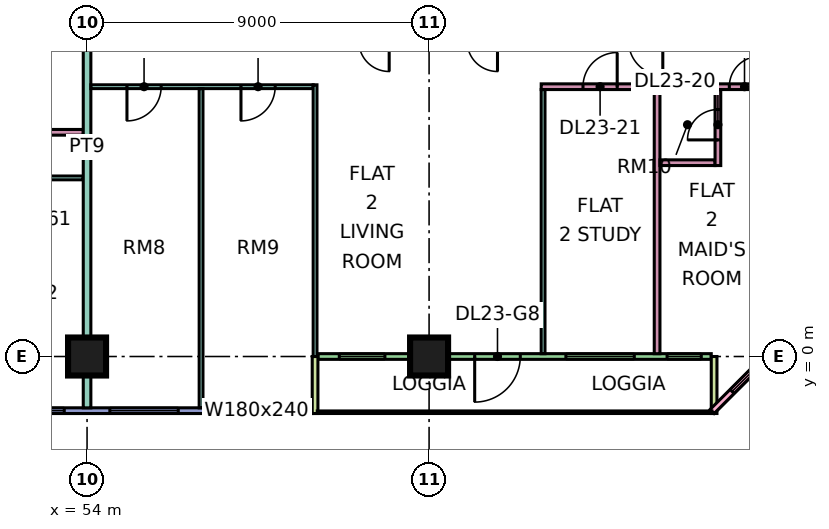
"""IFC4 building model, lengths in metres.
Left out: names, types, materials, properties, quantities, classifications, styles, units other than length and angle.
Written with IfcOpenShell. Run it as: python <this file> out.ifc"""

import sys

from ifc_helpers import new_model, si_unit, direction, frame, frame_2d, origin, origin_2d, place, context, subcontext, project, spatial, rectangle, extrude, element, fill, save


model = new_model("IFC4")
c1 = context("Model", 3, precision=1e-05, world=origin(), true_north=direction((0.0, 1.0)))
c2 = subcontext(c1, "Body", "Model", "MODEL_VIEW")
j1 = project(units=[si_unit("LENGTHUNIT", "METRE"), si_unit("PLANEANGLEUNIT", "RADIAN")], contexts=[c1])
p1 = place(None, origin())
s1 = spatial("IfcSite", under=j1, at=p1, CompositionType="ELEMENT")
p2 = place(p1, origin())
s2 = spatial("IfcBuilding", under=s1, at=p2, CompositionType="ELEMENT")
p3 = place(p2, frame((0.0, 0.0, 103.15)))
s3 = spatial("IfcBuildingStorey", under=s2, at=p3, CompositionType="ELEMENT", Elevation=103.15)
for number, where, z_axis, x_axis in (
    (1, (54.0, 0.0, 0.0), (0.0, 0.0, 1.0), (1.0, 0.0, 0.0)),
    (2, (63.0, 0.0, 0.0), (0.0, 0.0, 1.0), (1.0, 0.0, 0.0)),
):
    element("IfcColumn", number, at=place(p3, frame(where, z_axis=z_axis, x_axis=x_axis)), inside=s3, PredefinedType="COLUMN", context=c2, shape_type="SweptSolid", body=[
        extrude(rectangle(XDim=1.0, YDim=1.0, at=origin_2d()), origin(), (0.0, 0.0, 1.0), 3.75),
    ])
p4 = place(p3, frame((48.075, -1.425, 0.0), z_axis=(0.0, 0.0, 1.0), x_axis=(1.0, 0.0, 0.0)))
e3 = element("IfcWall", 3, at=p4, inside=s3, PredefinedType="SOLIDWALL", context=c2, shape_type="SweptSolid", body=[
    extrude(rectangle(XDim=11.85, YDim=0.15, at=frame_2d((5.925, 0.0))), origin(), (0.0, 0.0, 1.0), 3.35),
])
p5 = place(p4, frame((0.562, 0.0, 0.45)))
e4 = element("IfcOpeningElement", 4, at=p5, cuts=e3, PredefinedType="OPENING", context=c2, shape_type="SweptSolid", body=[
    extrude(rectangle(XDim=1.8, YDim=2.4, at=frame_2d((0.9, 1.2))), frame((0.0, 0.085, 0.0), z_axis=(0.0, -1.0, 0.0), x_axis=(1.0, 0.0, 0.0)), (0.0, 0.0, 1.0), 0.17),
])
p6 = place(p4, frame((3.525, 0.0, 0.45)))
e5 = element("IfcOpeningElement", 5, at=p6, cuts=e3, PredefinedType="OPENING", context=c2, shape_type="SweptSolid", body=[
    extrude(rectangle(XDim=1.8, YDim=2.4, at=frame_2d((0.9, 1.2))), frame((0.0, 0.085, 0.0), z_axis=(0.0, -1.0, 0.0), x_axis=(1.0, 0.0, 0.0)), (0.0, 0.0, 1.0), 0.17),
])
p7 = place(p4, frame((6.525, 0.0, 0.45)))
e6 = element("IfcOpeningElement", 6, at=p7, cuts=e3, PredefinedType="OPENING", context=c2, shape_type="SweptSolid", body=[
    extrude(rectangle(XDim=1.8, YDim=2.4, at=frame_2d((0.9, 1.2))), frame((0.0, 0.085, 0.0), z_axis=(0.0, -1.0, 0.0), x_axis=(1.0, 0.0, 0.0)), (0.0, 0.0, 1.0), 0.17),
])
p8 = place(p4, frame((9.488, 0.0, 0.45)))
e7 = element("IfcOpeningElement", 7, at=p8, cuts=e3, PredefinedType="OPENING", context=c2, shape_type="SweptSolid", body=[
    extrude(rectangle(XDim=1.8, YDim=2.4, at=frame_2d((0.9, 1.2))), frame((0.0, 0.085, 0.0), z_axis=(0.0, -1.0, 0.0), x_axis=(1.0, 0.0, 0.0)), (0.0, 0.0, 1.0), 0.17),
])
p9 = place(p3, frame((60.075, 0.0, 0.0), z_axis=(0.0, 0.0, 1.0), x_axis=(1.0, 0.0, 0.0)))
e8 = element("IfcWall", 8, at=p9, inside=s3, PredefinedType="SOLIDWALL", context=c2, shape_type="SweptSolid", body=[
    extrude(rectangle(XDim=10.35, YDim=0.15, at=frame_2d((5.175, 0.0))), origin(), (0.0, 0.0, 1.0), 3.35),
])
p10 = place(p9, frame((0.562, 0.0, 0.45)))
e9 = element("IfcOpeningElement", 9, at=p10, cuts=e8, PredefinedType="OPENING", context=c2, shape_type="SweptSolid", body=[
    extrude(rectangle(XDim=1.2, YDim=2.4, at=frame_2d((0.6, 1.2))), frame((0.0, 0.085, 0.0), z_axis=(0.0, -1.0, 0.0), x_axis=(1.0, 0.0, 0.0)), (0.0, 0.0, 1.0), 0.17),
])
p11 = place(p9, frame((4.125, 0.0, 0.0)))
e10 = element("IfcOpeningElement", 10, at=p11, cuts=e8, PredefinedType="OPENING", context=c2, shape_type="SweptSolid", body=[
    extrude(rectangle(XDim=1.2, YDim=2.4, at=frame_2d((0.6, 1.2))), frame((0.0, 0.085, 0.0), z_axis=(0.0, -1.0, 0.0), x_axis=(1.0, 0.0, 0.0)), (0.0, 0.0, 1.0), 0.17),
])
p12 = place(p9, frame((6.525, 0.0, 0.45)))
e11 = element("IfcOpeningElement", 11, at=p12, cuts=e8, PredefinedType="OPENING", context=c2, shape_type="SweptSolid", body=[
    extrude(rectangle(XDim=1.8, YDim=2.4, at=frame_2d((0.9, 1.2))), frame((0.0, 0.085, 0.0), z_axis=(0.0, -1.0, 0.0), x_axis=(1.0, 0.0, 0.0)), (0.0, 0.0, 1.0), 0.17),
])
p13 = place(p9, frame((9.188, 0.0, 0.45)))
e12 = element("IfcOpeningElement", 12, at=p13, cuts=e8, PredefinedType="OPENING", context=c2, shape_type="SweptSolid", body=[
    extrude(rectangle(XDim=0.9, YDim=2.4, at=frame_2d((0.45, 1.2))), frame((0.0, 0.085, 0.0), z_axis=(0.0, -1.0, 0.0), x_axis=(1.0, 0.0, 0.0)), (0.0, 0.0, 1.0), 0.17),
])
for number, where, z_axis, x_axis in (
    (13, (60.0, -1.5, 0.0), (0.0, 0.0, 1.0), (0.0, 1.0, 0.0)),
    (14, (70.5, -1.5, 0.0), (0.0, 0.0, 1.0), (0.0, 1.0, 0.0)),
):
    element("IfcWall", number, at=place(p3, frame(where, z_axis=z_axis, x_axis=x_axis)), inside=s3, PredefinedType="SOLIDWALL", context=c2, shape_type="SweptSolid", body=[
        extrude(rectangle(XDim=1.5, YDim=0.15, at=frame_2d((0.75, 0.0))), origin(), (0.0, 0.0, 1.0), 3.35),
    ])
p14 = place(p3, frame((70.447, -1.447, 0.0), z_axis=(0.0, 0.0, 1.0), x_axis=(0.707106781187, 0.707106781187, 0.0)))
e15 = element("IfcWall", 15, at=p14, inside=s3, PredefinedType="SOLIDWALL", context=c2, shape_type="SweptSolid", body=[
    extrude(rectangle(XDim=4.243, YDim=0.15, at=frame_2d((2.121, 0.0))), origin(), (0.0, 0.0, 1.0), 3.35),
])
p15 = place(p14, frame((0.744, 0.0, 0.45)))
e16 = element("IfcOpeningElement", 16, at=p15, cuts=e15, PredefinedType="OPENING", context=c2, shape_type="SweptSolid", body=[
    extrude(rectangle(XDim=3.0, YDim=2.4, at=frame_2d((1.5, 1.2))), frame((0.0, 0.085, 0.0), z_axis=(0.0, -1.0, 0.0), x_axis=(1.0, 0.0, 0.0)), (0.0, 0.0, 1.0), 0.17),
])
p16 = place(p3, frame((33.05, 4.7, 0.0), z_axis=(0.0, 0.0, 1.0), x_axis=(1.0, 0.0, 0.0)))
e17 = element("IfcWall", 17, at=p16, inside=s3, PredefinedType="PARTITIONING", context=c2, shape_type="SweptSolid", body=[
    extrude(rectangle(XDim=20.85, YDim=0.1, at=frame_2d((10.425, 0.0))), origin(), (0.0, 0.0, 1.0), 3.35),
])
p17 = place(p16, frame((1.0, 0.0, 0.0)))
e18 = element("IfcOpeningElement", 18, at=p17, cuts=e17, PredefinedType="OPENING", context=c2, shape_type="SweptSolid", body=[
    extrude(rectangle(XDim=0.9, YDim=2.1, at=frame_2d((0.45, 1.05))), frame((0.0, 0.06, 0.0), z_axis=(0.0, -1.0, 0.0), x_axis=(1.0, 0.0, 0.0)), (0.0, 0.0, 1.0), 0.12),
])
p18 = place(p16, frame((4.0, 0.0, 0.0)))
e19 = element("IfcOpeningElement", 19, at=p18, cuts=e17, PredefinedType="OPENING", context=c2, shape_type="SweptSolid", body=[
    extrude(rectangle(XDim=0.9, YDim=2.1, at=frame_2d((0.45, 1.05))), frame((0.0, 0.06, 0.0), z_axis=(0.0, -1.0, 0.0), x_axis=(1.0, 0.0, 0.0)), (0.0, 0.0, 1.0), 0.12),
])
p19 = place(p16, frame((7.0, 0.0, 0.0)))
e20 = element("IfcOpeningElement", 20, at=p19, cuts=e17, PredefinedType="OPENING", context=c2, shape_type="SweptSolid", body=[
    extrude(rectangle(XDim=0.9, YDim=2.1, at=frame_2d((0.45, 1.05))), frame((0.0, 0.06, 0.0), z_axis=(0.0, -1.0, 0.0), x_axis=(1.0, 0.0, 0.0)), (0.0, 0.0, 1.0), 0.12),
])
p20 = place(p16, frame((19.0, 0.0, 0.0)))
e21 = element("IfcOpeningElement", 21, at=p20, cuts=e17, PredefinedType="OPENING", context=c2, shape_type="SweptSolid", body=[
    extrude(rectangle(XDim=0.9, YDim=2.1, at=frame_2d((0.45, 1.05))), frame((0.0, 0.06, 0.0), z_axis=(0.0, -1.0, 0.0), x_axis=(1.0, 0.0, 0.0)), (0.0, 0.0, 1.0), 0.12),
])
p21 = place(p16, frame((13.0, 0.0, 0.0)))
e22 = element("IfcOpeningElement", 22, at=p21, cuts=e17, PredefinedType="OPENING", context=c2, shape_type="SweptSolid", body=[
    extrude(rectangle(XDim=0.9, YDim=2.1, at=frame_2d((0.45, 1.05))), frame((0.0, 0.06, 0.0), z_axis=(0.0, -1.0, 0.0), x_axis=(1.0, 0.0, 0.0)), (0.0, 0.0, 1.0), 0.12),
])
p22 = place(p3, frame((43.575, 5.9, 0.0), z_axis=(0.0, 0.0, 1.0), x_axis=(1.0, 0.0, 0.0)))
e23 = element("IfcWall", 23, at=p22, inside=s3, PredefinedType="PARTITIONING", context=c2, shape_type="SweptSolid", body=[
    extrude(rectangle(XDim=10.325, YDim=0.15, at=frame_2d((5.163, 0.0))), origin(), (0.0, 0.0, 1.0), 3.35),
])
p23 = place(p22, frame((1.825, 0.0, 0.0)))
e24 = element("IfcOpeningElement", 24, at=p23, cuts=e23, PredefinedType="OPENING", context=c2, shape_type="SweptSolid", body=[
    extrude(rectangle(XDim=0.8, YDim=2.1, at=frame_2d((0.4, 1.05))), frame((0.0, 0.085, 0.0), z_axis=(0.0, -1.0, 0.0), x_axis=(1.0, 0.0, 0.0)), (0.0, 0.0, 1.0), 0.17),
])
p24 = place(p22, frame((6.975, 0.0, 0.0)))
e25 = element("IfcOpeningElement", 25, at=p24, cuts=e23, PredefinedType="OPENING", context=c2, shape_type="SweptSolid", body=[
    extrude(rectangle(XDim=0.9, YDim=2.1, at=frame_2d((0.45, 1.05))), frame((0.0, 0.085, 0.0), z_axis=(0.0, -1.0, 0.0), x_axis=(1.0, 0.0, 0.0)), (0.0, 0.0, 1.0), 0.17),
])
p25 = place(p3, frame((54.0, -1.351, 0.0), z_axis=(0.0, 0.0, 1.0), x_axis=(0.0, 1.0, 0.0)))
e26 = element("IfcWall", 26, at=p25, inside=s3, PredefinedType="PARTITIONING", context=c2, shape_type="SweptSolid", body=[
    extrude(rectangle(XDim=13.751, YDim=0.2, at=frame_2d((6.875, 0.0))), origin(), (0.0, 0.0, 1.0), 3.35),
])
p26 = place(p3, frame((54.1, 7.1, 0.0), z_axis=(0.0, 0.0, 1.0), x_axis=(1.0, 0.0, 0.0)))
e27 = element("IfcWall", 27, at=p26, inside=s3, PredefinedType="PARTITIONING", context=c2, shape_type="SweptSolid", body=[
    extrude(rectangle(XDim=5.85, YDim=0.1, at=frame_2d((2.925, 0.0))), origin(), (0.0, 0.0, 1.0), 3.35),
])
p27 = place(p26, frame((0.95, 0.0, 0.0)))
e28 = element("IfcOpeningElement", 28, at=p27, cuts=e27, PredefinedType="OPENING", context=c2, shape_type="SweptSolid", body=[
    extrude(rectangle(XDim=0.9, YDim=2.1, at=frame_2d((0.45, 1.05))), frame((0.0, 0.06, 0.0), z_axis=(0.0, -1.0, 0.0), x_axis=(1.0, 0.0, 0.0)), (0.0, 0.0, 1.0), 0.12),
])
p28 = place(p26, frame((3.95, 0.0, 0.0)))
e29 = element("IfcOpeningElement", 29, at=p28, cuts=e27, PredefinedType="OPENING", context=c2, shape_type="SweptSolid", body=[
    extrude(rectangle(XDim=0.9, YDim=2.1, at=frame_2d((0.45, 1.05))), frame((0.0, 0.06, 0.0), z_axis=(0.0, -1.0, 0.0), x_axis=(1.0, 0.0, 0.0)), (0.0, 0.0, 1.0), 0.12),
])
p29 = place(p3, frame((57.0, -1.351, 0.0), z_axis=(0.0, 0.0, 1.0), x_axis=(0.0, 1.0, 0.0)))
e30 = element("IfcWall", 30, at=p29, inside=s3, PredefinedType="PARTITIONING", context=c2, shape_type="SweptSolid", body=[
    extrude(rectangle(XDim=8.401, YDim=0.1, at=frame_2d((4.201, 0.0))), origin(), (0.0, 0.0, 1.0), 3.35),
])
p30 = place(p3, frame((60.0, 0.0, 0.0), z_axis=(0.0, 0.0, 1.0), x_axis=(0.0, 1.0, 0.0)))
e31 = element("IfcWall", 31, at=p30, inside=s3, PredefinedType="PARTITIONING", context=c2, shape_type="SweptSolid", body=[
    extrude(rectangle(XDim=7.15, YDim=0.1, at=frame_2d((3.575, 0.0))), origin(), (0.0, 0.0, 1.0), 3.35),
])
p31 = place(p3, frame((65.95, 7.1, 0.0), z_axis=(0.0, 0.0, 1.0), x_axis=(1.0, 0.0, 0.0)))
e32 = element("IfcWall", 32, at=p31, inside=s3, PredefinedType="PARTITIONING", context=c2, shape_type="SweptSolid", body=[
    extrude(rectangle(XDim=7.4, YDim=0.15, at=frame_2d((3.7, 0.0))), origin(), (0.0, 0.0, 1.0), 3.35),
])
p32 = place(p31, frame((4.95, 0.0, 0.0)))
e33 = element("IfcOpeningElement", 33, at=p32, cuts=e32, PredefinedType="OPENING", context=c2, shape_type="SweptSolid", body=[
    extrude(rectangle(XDim=0.8, YDim=2.1, at=frame_2d((0.4, 1.05))), frame((0.0, 0.085, 0.0), z_axis=(0.0, -1.0, 0.0), x_axis=(1.0, 0.0, 0.0)), (0.0, 0.0, 1.0), 0.17),
])
p33 = place(p31, frame((1.1, 0.0, 0.0)))
e34 = element("IfcOpeningElement", 34, at=p33, cuts=e32, PredefinedType="OPENING", context=c2, shape_type="SweptSolid", body=[
    extrude(rectangle(XDim=0.9, YDim=2.1, at=frame_2d((0.45, 1.05))), frame((0.0, 0.085, 0.0), z_axis=(0.0, -1.0, 0.0), x_axis=(1.0, 0.0, 0.0)), (0.0, 0.0, 1.0), 0.17),
])
p34 = place(p3, frame((66.0, 0.074, 0.0), z_axis=(0.0, 0.0, 1.0), x_axis=(0.0, 1.0, 0.0)))
e35 = element("IfcWall", 35, at=p34, inside=s3, PredefinedType="PARTITIONING", context=c2, shape_type="SweptSolid", body=[
    extrude(rectangle(XDim=6.951, YDim=0.1, at=frame_2d((3.476, 0.0))), origin(), (0.0, 0.0, 1.0), 3.35),
])
p35 = place(p3, frame((69.0, 0.074, 0.0), z_axis=(0.0, 0.0, 1.0), x_axis=(0.0, 1.0, 0.0)))
e36 = element("IfcWall", 36, at=p35, inside=s3, PredefinedType="PARTITIONING", context=c2, shape_type="SweptSolid", body=[
    extrude(rectangle(XDim=6.951, YDim=0.15, at=frame_2d((3.476, 0.0))), origin(), (0.0, 0.0, 1.0), 3.35),
])
p36 = place(p3, frame((69.075, 5.1, 0.0), z_axis=(0.0, 0.0, 1.0), x_axis=(1.0, 0.0, 0.0)))
e37 = element("IfcWall", 37, at=p36, inside=s3, PredefinedType="PARTITIONING", context=c2, shape_type="SweptSolid", body=[
    extrude(rectangle(XDim=1.45, YDim=0.15, at=frame_2d((0.725, 0.0))), origin(), (0.0, 0.0, 1.0), 3.35),
])
p37 = place(p3, frame((70.6, 5.025, 0.0), z_axis=(0.0, 0.0, 1.0), x_axis=(0.0, 1.0, 0.0)))
e38 = element("IfcWall", 38, at=p37, inside=s3, PredefinedType="PARTITIONING", context=c2, shape_type="SweptSolid", body=[
    extrude(rectangle(XDim=2.0, YDim=0.15, at=frame_2d((1.0, 0.0))), origin(), (0.0, 0.0, 1.0), 3.35),
])
p38 = place(p37, frame((0.675, 0.0, 0.0)))
e39 = element("IfcOpeningElement", 39, at=p38, cuts=e38, PredefinedType="OPENING", context=c2, shape_type="SweptSolid", body=[
    extrude(rectangle(XDim=0.8, YDim=2.1, at=frame_2d((0.4, 1.05))), frame((0.0, 0.085, 0.0), z_axis=(0.0, -1.0, 0.0), x_axis=(1.0, 0.0, 0.0)), (0.0, 0.0, 1.0), 0.17),
])
p39 = place(p6, origin())
e40 = element("IfcWindow", 40, at=p39, inside=s3, PartitioningType="SINGLE_PANEL", PredefinedType="WINDOW", context=c2, shape_type="SweptSolid", body=[
    extrude(rectangle(XDim=1.8, YDim=2.4, at=frame_2d((0.9, 1.2))), frame((0.0, 0.03, 0.0), z_axis=(0.0, -1.0, 0.0), x_axis=(1.0, 0.0, 0.0)), (0.0, 0.0, 1.0), 0.06),
])
fill(e5, e40)
p40 = place(p7, origin())
e41 = element("IfcWindow", 41, at=p40, inside=s3, PartitioningType="SINGLE_PANEL", PredefinedType="WINDOW", context=c2, shape_type="SweptSolid", body=[
    extrude(rectangle(XDim=1.8, YDim=2.4, at=frame_2d((0.9, 1.2))), frame((0.0, 0.03, 0.0), z_axis=(0.0, -1.0, 0.0), x_axis=(1.0, 0.0, 0.0)), (0.0, 0.0, 1.0), 0.06),
])
fill(e6, e41)
p41 = place(p8, origin())
e42 = element("IfcWindow", 42, at=p41, inside=s3, PartitioningType="SINGLE_PANEL", PredefinedType="WINDOW", context=c2, shape_type="SweptSolid", body=[
    extrude(rectangle(XDim=1.8, YDim=2.4, at=frame_2d((0.9, 1.2))), frame((0.0, 0.03, 0.0), z_axis=(0.0, -1.0, 0.0), x_axis=(1.0, 0.0, 0.0)), (0.0, 0.0, 1.0), 0.06),
])
fill(e7, e42)
p42 = place(p10, origin())
e43 = element("IfcWindow", 43, at=p42, inside=s3, PartitioningType="SINGLE_PANEL", PredefinedType="WINDOW", context=c2, shape_type="SweptSolid", body=[
    extrude(rectangle(XDim=1.2, YDim=2.4, at=frame_2d((0.6, 1.2))), frame((0.0, 0.03, 0.0), z_axis=(0.0, -1.0, 0.0), x_axis=(1.0, 0.0, 0.0)), (0.0, 0.0, 1.0), 0.06),
])
fill(e9, e43)
p43 = place(p11, frame((1.2, 0.0, 0.0), z_axis=(0.0, 0.0, 1.0), x_axis=(-1.0, 0.0, 0.0)))
e44 = element("IfcDoor", 44, at=p43, inside=s3, OperationType="DOUBLE_DOOR_SINGLE_SWING", PredefinedType="DOOR", context=c2, shape_type="SweptSolid", body=[
    extrude(rectangle(XDim=1.2, YDim=2.4, at=frame_2d((0.6, 1.2))), frame((0.0, 0.025, 0.0), z_axis=(0.0, -1.0, 0.0), x_axis=(1.0, 0.0, 0.0)), (0.0, 0.0, 1.0), 0.05),
])
fill(e10, e44)
p44 = place(p12, origin())
e45 = element("IfcWindow", 45, at=p44, inside=s3, PartitioningType="SINGLE_PANEL", PredefinedType="WINDOW", context=c2, shape_type="SweptSolid", body=[
    extrude(rectangle(XDim=1.8, YDim=2.4, at=frame_2d((0.9, 1.2))), frame((0.0, 0.03, 0.0), z_axis=(0.0, -1.0, 0.0), x_axis=(1.0, 0.0, 0.0)), (0.0, 0.0, 1.0), 0.06),
])
fill(e11, e45)
p45 = place(p13, origin())
e46 = element("IfcWindow", 46, at=p45, inside=s3, PartitioningType="SINGLE_PANEL", PredefinedType="WINDOW", context=c2, shape_type="SweptSolid", body=[
    extrude(rectangle(XDim=0.9, YDim=2.4, at=frame_2d((0.45, 1.2))), frame((0.0, 0.03, 0.0), z_axis=(0.0, -1.0, 0.0), x_axis=(1.0, 0.0, 0.0)), (0.0, 0.0, 1.0), 0.06),
])
fill(e12, e46)
p46 = place(p15, origin())
e47 = element("IfcWindow", 47, at=p46, inside=s3, PartitioningType="SINGLE_PANEL", PredefinedType="WINDOW", context=c2, shape_type="SweptSolid", body=[
    extrude(rectangle(XDim=3.0, YDim=2.4, at=frame_2d((1.5, 1.2))), frame((0.0, 0.03, 0.0), z_axis=(0.0, -1.0, 0.0), x_axis=(1.0, 0.0, 0.0)), (0.0, 0.0, 1.0), 0.06),
])
fill(e16, e47)
p47 = place(p27, frame((0.9, 0.0, 0.0), z_axis=(0.0, 0.0, 1.0), x_axis=(-1.0, 0.0, 0.0)))
e48 = element("IfcDoor", 48, at=p47, inside=s3, OperationType="SINGLE_SWING_LEFT", PredefinedType="DOOR", context=c2, shape_type="SweptSolid", body=[
    extrude(rectangle(XDim=0.9, YDim=2.1, at=frame_2d((0.45, 1.05))), frame((0.0, 0.025, 0.0), z_axis=(0.0, -1.0, 0.0), x_axis=(1.0, 0.0, 0.0)), (0.0, 0.0, 1.0), 0.05),
])
fill(e28, e48)
p48 = place(p28, frame((0.9, 0.0, 0.0), z_axis=(0.0, 0.0, 1.0), x_axis=(-1.0, 0.0, 0.0)))
e49 = element("IfcDoor", 49, at=p48, inside=s3, OperationType="SINGLE_SWING_LEFT", PredefinedType="DOOR", context=c2, shape_type="SweptSolid", body=[
    extrude(rectangle(XDim=0.9, YDim=2.1, at=frame_2d((0.45, 1.05))), frame((0.0, 0.025, 0.0), z_axis=(0.0, -1.0, 0.0), x_axis=(1.0, 0.0, 0.0)), (0.0, 0.0, 1.0), 0.05),
])
fill(e29, e49)
p49 = place(p32, frame((0.8, 0.0, 0.0), z_axis=(0.0, 0.0, 1.0), x_axis=(-1.0, 0.0, 0.0)))
e50 = element("IfcDoor", 50, at=p49, inside=s3, OperationType="SINGLE_SWING_RIGHT", PredefinedType="DOOR", context=c2, shape_type="SweptSolid", body=[
    extrude(rectangle(XDim=0.8, YDim=2.1, at=frame_2d((0.4, 1.05))), frame((0.0, 0.025, 0.0), z_axis=(0.0, -1.0, 0.0), x_axis=(1.0, 0.0, 0.0)), (0.0, 0.0, 1.0), 0.05),
])
fill(e33, e50)
p50 = place(p38, origin())
e51 = element("IfcDoor", 51, at=p50, inside=s3, OperationType="SINGLE_SWING_LEFT", PredefinedType="DOOR", context=c2, shape_type="SweptSolid", body=[
    extrude(rectangle(XDim=0.8, YDim=2.1, at=frame_2d((0.4, 1.05))), frame((0.0, 0.025, 0.0), z_axis=(0.0, -1.0, 0.0), x_axis=(1.0, 0.0, 0.0)), (0.0, 0.0, 1.0), 0.05),
])
fill(e39, e51)
p51 = place(p33, frame((0.9, 0.0, 0.0), z_axis=(0.0, 0.0, 1.0), x_axis=(-1.0, 0.0, 0.0)))
e52 = element("IfcDoor", 52, at=p51, inside=s3, OperationType="SINGLE_SWING_RIGHT", PredefinedType="DOOR", context=c2, shape_type="SweptSolid", body=[
    extrude(rectangle(XDim=0.9, YDim=2.1, at=frame_2d((0.45, 1.05))), frame((0.0, 0.025, 0.0), z_axis=(0.0, -1.0, 0.0), x_axis=(1.0, 0.0, 0.0)), (0.0, 0.0, 1.0), 0.05),
])
fill(e34, e52)
save(model, sys.argv[1])
